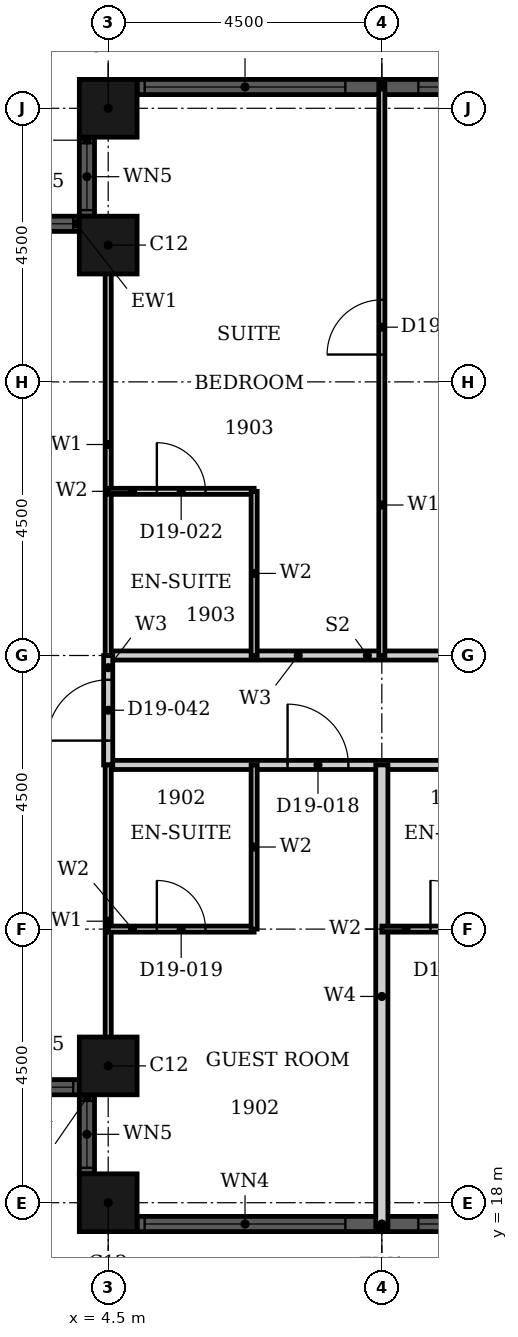
"""IFC4 building model, lengths in metres.
Left out: names, types, materials, properties, quantities, classifications, styles, units other than length and angle.
Written with IfcOpenShell. Run it as: python <this file> out.ifc"""

import sys

from ifc_helpers import new_model, si_unit, direction, frame, frame_2d, origin, origin_2d, place, context, subcontext, project, spatial, rectangle, hollow_rectangle, extrude, element, fill, save


model = new_model("IFC4")
c1 = context("Model", 3, precision=1e-05, world=origin(), true_north=direction((0.0, 1.0)))
c2 = subcontext(c1, "Body", "Model", "MODEL_VIEW")
j1 = project(units=[si_unit("LENGTHUNIT", "METRE"), si_unit("PLANEANGLEUNIT", "RADIAN")], contexts=[c1])
p1 = place(None, origin())
s1 = spatial("IfcSite", under=j1, at=p1, CompositionType="ELEMENT")
p2 = place(p1, origin())
s2 = spatial("IfcBuilding", under=s1, at=p2, CompositionType="ELEMENT")
p3 = place(p2, frame((0.0, 0.0, 81.6)))
s3 = spatial("IfcBuildingStorey", under=s2, at=p3, CompositionType="ELEMENT", Elevation=81.6)
for number, where, z_axis, x_axis in (
    (1, (4.5, 36.0, 0.0), (0.0, 0.0, 1.0), (1.0, 0.0, 0.0)),
    (2, (4.5, 33.75, 0.0), (0.0, 0.0, 1.0), (1.0, 0.0, 0.0)),
    (3, (4.5, 20.25, 0.0), (0.0, 0.0, 1.0), (1.0, 0.0, 0.0)),
    (4, (4.5, 18.0, 0.0), (0.0, 0.0, 1.0), (1.0, 0.0, 0.0)),
):
    element("IfcColumn", number, at=place(p3, frame(where, z_axis=z_axis, x_axis=x_axis)), inside=s3, PredefinedType="COLUMN", context=c2, shape_type="SweptSolid", body=[
        extrude(hollow_rectangle(XDim=0.95, YDim=0.95, WallThickness=0.03, at=origin_2d()), origin(), (0.0, 0.0, 1.0), 3.6),
    ])
p4 = place(p3, frame((13.025, 36.35, 0.0), z_axis=(0.0, 0.0, 1.0), x_axis=(-1.0, 0.0, 0.0)))
e5 = element("IfcWall", 5, at=p4, inside=s3, PredefinedType="SOLIDWALL", context=c2, shape_type="SweptSolid", body=[
    extrude(rectangle(XDim=8.05, YDim=0.25, at=frame_2d((4.025, 0.0))), origin(), (0.0, 0.0, 1.0), 3.6),
])
p5 = place(p4, frame((0.125, 0.0, 0.9)))
e6 = element("IfcOpeningElement", 6, at=p5, cuts=e5, PredefinedType="OPENING", context=c2, shape_type="SweptSolid", body=[
    extrude(rectangle(XDim=3.3, YDim=2.08, at=frame_2d((1.65, 1.04))), frame((0.0, 0.135, 0.0), z_axis=(0.0, -1.0, 0.0), x_axis=(1.0, 0.0, 0.0)), (0.0, 0.0, 1.0), 0.27),
])
p6 = place(p4, frame((4.625, 0.0, 0.9)))
e7 = element("IfcOpeningElement", 7, at=p6, cuts=e5, PredefinedType="OPENING", context=c2, shape_type="SweptSolid", body=[
    extrude(rectangle(XDim=3.3, YDim=2.08, at=frame_2d((1.65, 1.04))), frame((0.0, 0.135, 0.0), z_axis=(0.0, -1.0, 0.0), x_axis=(1.0, 0.0, 0.0)), (0.0, 0.0, 1.0), 0.27),
])
p7 = place(p3, frame((4.15, 35.525, 0.0), z_axis=(0.0, 0.0, 1.0), x_axis=(0.0, -1.0, 0.0)))
e8 = element("IfcWall", 8, at=p7, inside=s3, PredefinedType="SOLIDWALL", context=c2, shape_type="SweptSolid", body=[
    extrude(rectangle(XDim=1.3, YDim=0.25, at=frame_2d((0.65, 0.0))), origin(), (0.0, 0.0, 1.0), 3.6),
])
p8 = place(p7, frame((0.1, 0.0, 0.9)))
e9 = element("IfcOpeningElement", 9, at=p8, cuts=e8, PredefinedType="OPENING", context=c2, shape_type="SweptSolid", body=[
    extrude(rectangle(XDim=1.1, YDim=2.08, at=frame_2d((0.55, 1.04))), frame((0.0, 0.135, 0.0), z_axis=(0.0, -1.0, 0.0), x_axis=(1.0, 0.0, 0.0)), (0.0, 0.0, 1.0), 0.27),
])
p9 = place(p3, frame((4.025, 34.1, 0.0), z_axis=(0.0, 0.0, 1.0), x_axis=(-1.0, 0.0, 0.0)))
e10 = element("IfcWall", 10, at=p9, inside=s3, PredefinedType="SOLIDWALL", context=c2, shape_type="SweptSolid", body=[
    extrude(rectangle(XDim=1.3, YDim=0.25, at=frame_2d((0.65, 0.0))), origin(), (0.0, 0.0, 1.0), 3.6),
])
p10 = place(p9, frame((0.1, 0.0, 0.9)))
e11 = element("IfcOpeningElement", 11, at=p10, cuts=e10, PredefinedType="OPENING", context=c2, shape_type="SweptSolid", body=[
    extrude(rectangle(XDim=1.1, YDim=2.08, at=frame_2d((0.55, 1.04))), frame((0.0, 0.135, 0.0), z_axis=(0.0, -1.0, 0.0), x_axis=(1.0, 0.0, 0.0)), (0.0, 0.0, 1.0), 0.27),
])
p11 = place(p3, frame((2.725, 19.9, 0.0), z_axis=(0.0, 0.0, 1.0), x_axis=(1.0, 0.0, 0.0)))
e12 = element("IfcWall", 12, at=p11, inside=s3, PredefinedType="SOLIDWALL", context=c2, shape_type="SweptSolid", body=[
    extrude(rectangle(XDim=1.3, YDim=0.25, at=frame_2d((0.65, 0.0))), origin(), (0.0, 0.0, 1.0), 3.6),
])
p12 = place(p11, frame((0.1, 0.0, 0.9)))
e13 = element("IfcOpeningElement", 13, at=p12, cuts=e12, PredefinedType="OPENING", context=c2, shape_type="SweptSolid", body=[
    extrude(rectangle(XDim=1.1, YDim=2.08, at=frame_2d((0.55, 1.04))), frame((0.0, 0.135, 0.0), z_axis=(0.0, -1.0, 0.0), x_axis=(1.0, 0.0, 0.0)), (0.0, 0.0, 1.0), 0.27),
])
p13 = place(p3, frame((4.15, 19.775, 0.0), z_axis=(0.0, 0.0, 1.0), x_axis=(0.0, -1.0, 0.0)))
e14 = element("IfcWall", 14, at=p13, inside=s3, PredefinedType="SOLIDWALL", context=c2, shape_type="SweptSolid", body=[
    extrude(rectangle(XDim=1.3, YDim=0.25, at=frame_2d((0.65, 0.0))), origin(), (0.0, 0.0, 1.0), 3.6),
])
p14 = place(p13, frame((0.1, 0.0, 0.9)))
e15 = element("IfcOpeningElement", 15, at=p14, cuts=e14, PredefinedType="OPENING", context=c2, shape_type="SweptSolid", body=[
    extrude(rectangle(XDim=1.1, YDim=2.08, at=frame_2d((0.55, 1.04))), frame((0.0, 0.135, 0.0), z_axis=(0.0, -1.0, 0.0), x_axis=(1.0, 0.0, 0.0)), (0.0, 0.0, 1.0), 0.27),
])
p15 = place(p3, frame((4.975, 17.65, 0.0), z_axis=(0.0, 0.0, 1.0), x_axis=(1.0, 0.0, 0.0)))
e16 = element("IfcWall", 16, at=p15, inside=s3, PredefinedType="SOLIDWALL", context=c2, shape_type="SweptSolid", body=[
    extrude(rectangle(XDim=8.05, YDim=0.25, at=frame_2d((4.025, 0.0))), origin(), (0.0, 0.0, 1.0), 3.6),
])
p16 = place(p15, frame((0.125, 0.0, 0.9)))
e17 = element("IfcOpeningElement", 17, at=p16, cuts=e16, PredefinedType="OPENING", context=c2, shape_type="SweptSolid", body=[
    extrude(rectangle(XDim=3.3, YDim=2.08, at=frame_2d((1.65, 1.04))), frame((0.0, 0.135, 0.0), z_axis=(0.0, -1.0, 0.0), x_axis=(1.0, 0.0, 0.0)), (0.0, 0.0, 1.0), 0.27),
])
p17 = place(p15, frame((4.625, 0.0, 0.9)))
e18 = element("IfcOpeningElement", 18, at=p17, cuts=e16, PredefinedType="OPENING", context=c2, shape_type="SweptSolid", body=[
    extrude(rectangle(XDim=3.3, YDim=2.08, at=frame_2d((1.65, 1.04))), frame((0.0, 0.135, 0.0), z_axis=(0.0, -1.0, 0.0), x_axis=(1.0, 0.0, 0.0)), (0.0, 0.0, 1.0), 0.27),
])
p18 = place(p3, frame((4.5, 25.2, 0.0), z_axis=(0.0, 0.0, 1.0), x_axis=(1.0, 0.0, 0.0)))
e19 = element("IfcWall", 19, at=p18, inside=s3, PredefinedType="PARTITIONING", context=c2, shape_type="SweptSolid", body=[
    extrude(rectangle(XDim=11.7, YDim=0.15, at=frame_2d((5.85, 0.0))), origin(), (0.0, 0.0, 1.0), 3.3),
])
p19 = place(p18, frame((7.45, 0.0, 0.0)))
e20 = element("IfcOpeningElement", 20, at=p19, cuts=e19, PredefinedType="OPENING", context=c2, shape_type="SweptSolid", body=[
    extrude(rectangle(XDim=1.0, YDim=2.1, at=frame_2d((0.5, 1.05))), frame((0.0, 0.085, 0.0), z_axis=(0.0, -1.0, 0.0), x_axis=(1.0, 0.0, 0.0)), (0.0, 0.0, 1.0), 0.17),
])
p20 = place(p18, frame((2.95, 0.0, 0.0)))
e21 = element("IfcOpeningElement", 21, at=p20, cuts=e19, PredefinedType="OPENING", context=c2, shape_type="SweptSolid", body=[
    extrude(rectangle(XDim=1.0, YDim=2.1, at=frame_2d((0.5, 1.05))), frame((0.0, 0.085, 0.0), z_axis=(0.0, -1.0, 0.0), x_axis=(1.0, 0.0, 0.0)), (0.0, 0.0, 1.0), 0.17),
])
p21 = place(p3, frame((4.5, 27.0, 0.0), z_axis=(0.0, 0.0, 1.0), x_axis=(1.0, 0.0, 0.0)))
e22 = element("IfcWall", 22, at=p21, inside=s3, PredefinedType="PARTITIONING", context=c2, shape_type="SweptSolid", body=[
    extrude(rectangle(XDim=11.7, YDim=0.15, at=frame_2d((5.85, 0.0))), origin(), (0.0, 0.0, 1.0), 2.58),
])
p22 = place(p21, frame((6.25, 0.0, 0.0)))
e23 = element("IfcOpeningElement", 23, at=p22, cuts=e22, PredefinedType="OPENING", context=c2, shape_type="SweptSolid", body=[
    extrude(rectangle(XDim=1.0, YDim=2.1, at=frame_2d((0.5, 1.05))), frame((0.0, 0.085, 0.0), z_axis=(0.0, -1.0, 0.0), x_axis=(1.0, 0.0, 0.0)), (0.0, 0.0, 1.0), 0.17),
])
p23 = place(p3, frame((4.5, 25.2, 0.0), z_axis=(0.0, 0.0, 1.0), x_axis=(0.0, 1.0, 0.0)))
e24 = element("IfcWall", 24, at=p23, inside=s3, PredefinedType="PARTITIONING", context=c2, shape_type="SweptSolid", body=[
    extrude(rectangle(XDim=1.8, YDim=0.15, at=frame_2d((0.9, 0.0))), origin(), (0.0, 0.0, 1.0), 3.3),
])
p24 = place(p23, frame((0.4, 0.0, 0.0)))
e25 = element("IfcOpeningElement", 25, at=p24, cuts=e24, PredefinedType="OPENING", context=c2, shape_type="SweptSolid", body=[
    extrude(rectangle(XDim=1.0, YDim=2.1, at=frame_2d((0.5, 1.05))), frame((0.0, 0.085, 0.0), z_axis=(0.0, -1.0, 0.0), x_axis=(1.0, 0.0, 0.0)), (0.0, 0.0, 1.0), 0.17),
])
p25 = place(p3, frame((4.5, 20.06, 0.0), z_axis=(0.0, 0.0, 1.0), x_axis=(0.0, 1.0, 0.0)))
e26 = element("IfcWall", 26, at=p25, inside=s3, PredefinedType="PARTITIONING", context=c2, shape_type="SweptSolid", body=[
    extrude(rectangle(XDim=5.14, YDim=0.1, at=frame_2d((2.57, 0.0))), origin(), (0.0, 0.0, 1.0), 3.3),
])
p26 = place(p3, frame((4.5, 27.0, 0.0), z_axis=(0.0, 0.0, 1.0), x_axis=(0.0, 1.0, 0.0)))
e27 = element("IfcWall", 27, at=p26, inside=s3, PredefinedType="PARTITIONING", context=c2, shape_type="SweptSolid", body=[
    extrude(rectangle(XDim=6.94, YDim=0.1, at=frame_2d((3.47, 0.0))), origin(), (0.0, 0.0, 1.0), 3.3),
])
p27 = place(p3, frame((9.0, 27.0, 0.0), z_axis=(0.0, 0.0, 1.0), x_axis=(0.0, 1.0, 0.0)))
e28 = element("IfcWall", 28, at=p27, inside=s3, PredefinedType="PARTITIONING", context=c2, shape_type="SweptSolid", body=[
    extrude(rectangle(XDim=9.415, YDim=0.1, at=frame_2d((4.708, 0.0))), origin(), (0.0, 0.0, 1.0), 3.3),
])
p28 = place(p27, frame((4.95, 0.0, 0.0)))
e29 = element("IfcOpeningElement", 29, at=p28, cuts=e28, PredefinedType="OPENING", context=c2, shape_type="SweptSolid", body=[
    extrude(rectangle(XDim=0.9, YDim=2.1, at=frame_2d((0.45, 1.05))), frame((0.0, 0.06, 0.0), z_axis=(0.0, -1.0, 0.0), x_axis=(1.0, 0.0, 0.0)), (0.0, 0.0, 1.0), 0.12),
])
p29 = place(p3, frame((9.0, 17.585, 0.0), z_axis=(0.0, 0.0, 1.0), x_axis=(0.0, 1.0, 0.0)))
e30 = element("IfcWall", 30, at=p29, inside=s3, PredefinedType="PARTITIONING", context=c2, shape_type="SweptSolid", body=[
    extrude(rectangle(XDim=7.615, YDim=0.2, at=frame_2d((3.808, 0.0))), origin(), (0.0, 0.0, 1.0), 3.3),
])
p30 = place(p3, frame((9.0, 22.5, 0.0), z_axis=(0.0, 0.0, 1.0), x_axis=(1.0, 0.0, 0.0)))
e31 = element("IfcWall", 31, at=p30, inside=s3, PredefinedType="PARTITIONING", context=c2, shape_type="SweptSolid", body=[
    extrude(rectangle(XDim=2.4, YDim=0.1, at=frame_2d((1.2, 0.0))), origin(), (0.0, 0.0, 1.0), 2.58),
])
p31 = place(p30, frame((0.8, 0.0, 0.0)))
e32 = element("IfcOpeningElement", 32, at=p31, cuts=e31, PredefinedType="OPENING", context=c2, shape_type="SweptSolid", body=[
    extrude(rectangle(XDim=0.8, YDim=2.1, at=frame_2d((0.4, 1.05))), frame((0.0, 0.06, 0.0), z_axis=(0.0, -1.0, 0.0), x_axis=(1.0, 0.0, 0.0)), (0.0, 0.0, 1.0), 0.12),
])
p32 = place(p3, frame((4.5, 22.5, 0.0), z_axis=(0.0, 0.0, 1.0), x_axis=(1.0, 0.0, 0.0)))
e33 = element("IfcWall", 33, at=p32, inside=s3, PredefinedType="PARTITIONING", context=c2, shape_type="SweptSolid", body=[
    extrude(rectangle(XDim=2.4, YDim=0.1, at=frame_2d((1.2, 0.0))), origin(), (0.0, 0.0, 1.0), 2.58),
])
p33 = place(p32, frame((0.8, 0.0, 0.0)))
e34 = element("IfcOpeningElement", 34, at=p33, cuts=e33, PredefinedType="OPENING", context=c2, shape_type="SweptSolid", body=[
    extrude(rectangle(XDim=0.8, YDim=2.1, at=frame_2d((0.4, 1.05))), frame((0.0, 0.06, 0.0), z_axis=(0.0, -1.0, 0.0), x_axis=(1.0, 0.0, 0.0)), (0.0, 0.0, 1.0), 0.12),
])
p34 = place(p3, frame((4.5, 29.7, 0.0), z_axis=(0.0, 0.0, 1.0), x_axis=(1.0, 0.0, 0.0)))
e35 = element("IfcWall", 35, at=p34, inside=s3, PredefinedType="PARTITIONING", context=c2, shape_type="SweptSolid", body=[
    extrude(rectangle(XDim=2.4, YDim=0.1, at=frame_2d((1.2, 0.0))), origin(), (0.0, 0.0, 1.0), 3.3),
])
p35 = place(p34, frame((0.8, 0.0, 0.0)))
e36 = element("IfcOpeningElement", 36, at=p35, cuts=e35, PredefinedType="OPENING", context=c2, shape_type="SweptSolid", body=[
    extrude(rectangle(XDim=0.8, YDim=2.1, at=frame_2d((0.4, 1.05))), frame((0.0, 0.06, 0.0), z_axis=(0.0, -1.0, 0.0), x_axis=(1.0, 0.0, 0.0)), (0.0, 0.0, 1.0), 0.12),
])
for number, where, z_axis, x_axis in (
    (37, (6.9, 22.5, 0.0), (0.0, 0.0, 1.0), (0.0, 1.0, 0.0)),
    (38, (6.9, 27.0, 0.0), (0.0, 0.0, 1.0), (0.0, 1.0, 0.0)),
):
    element("IfcWall", number, at=place(p3, frame(where, z_axis=z_axis, x_axis=x_axis)), inside=s3, PredefinedType="PARTITIONING", context=c2, shape_type="SweptSolid", body=[
        extrude(rectangle(XDim=2.7, YDim=0.1, at=frame_2d((1.35, 0.0))), origin(), (0.0, 0.0, 1.0), 3.3),
    ])
p36 = place(p5, origin())
e39 = element("IfcWindow", 39, at=p36, inside=s3, PartitioningType="SINGLE_PANEL", PredefinedType="WINDOW", context=c2, shape_type="SweptSolid", body=[
    extrude(rectangle(XDim=3.3, YDim=2.08, at=frame_2d((1.65, 1.04))), frame((0.0, 0.03, 0.0), z_axis=(0.0, -1.0, 0.0), x_axis=(1.0, 0.0, 0.0)), (0.0, 0.0, 1.0), 0.06),
])
fill(e6, e39)
p37 = place(p6, origin())
e40 = element("IfcWindow", 40, at=p37, inside=s3, PartitioningType="SINGLE_PANEL", PredefinedType="WINDOW", context=c2, shape_type="SweptSolid", body=[
    extrude(rectangle(XDim=3.3, YDim=2.08, at=frame_2d((1.65, 1.04))), frame((0.0, 0.03, 0.0), z_axis=(0.0, -1.0, 0.0), x_axis=(1.0, 0.0, 0.0)), (0.0, 0.0, 1.0), 0.06),
])
fill(e7, e40)
p38 = place(p8, origin())
e41 = element("IfcWindow", 41, at=p38, inside=s3, PartitioningType="SINGLE_PANEL", PredefinedType="WINDOW", context=c2, shape_type="SweptSolid", body=[
    extrude(rectangle(XDim=1.1, YDim=2.08, at=frame_2d((0.55, 1.04))), frame((0.0, 0.03, 0.0), z_axis=(0.0, -1.0, 0.0), x_axis=(1.0, 0.0, 0.0)), (0.0, 0.0, 1.0), 0.06),
])
fill(e9, e41)
p39 = place(p10, origin())
e42 = element("IfcWindow", 42, at=p39, inside=s3, PartitioningType="SINGLE_PANEL", PredefinedType="WINDOW", context=c2, shape_type="SweptSolid", body=[
    extrude(rectangle(XDim=1.1, YDim=2.08, at=frame_2d((0.55, 1.04))), frame((0.0, 0.03, 0.0), z_axis=(0.0, -1.0, 0.0), x_axis=(1.0, 0.0, 0.0)), (0.0, 0.0, 1.0), 0.06),
])
fill(e11, e42)
p40 = place(p12, origin())
e43 = element("IfcWindow", 43, at=p40, inside=s3, PartitioningType="SINGLE_PANEL", PredefinedType="WINDOW", context=c2, shape_type="SweptSolid", body=[
    extrude(rectangle(XDim=1.1, YDim=2.08, at=frame_2d((0.55, 1.04))), frame((0.0, 0.03, 0.0), z_axis=(0.0, -1.0, 0.0), x_axis=(1.0, 0.0, 0.0)), (0.0, 0.0, 1.0), 0.06),
])
fill(e13, e43)
p41 = place(p14, origin())
e44 = element("IfcWindow", 44, at=p41, inside=s3, PartitioningType="SINGLE_PANEL", PredefinedType="WINDOW", context=c2, shape_type="SweptSolid", body=[
    extrude(rectangle(XDim=1.1, YDim=2.08, at=frame_2d((0.55, 1.04))), frame((0.0, 0.03, 0.0), z_axis=(0.0, -1.0, 0.0), x_axis=(1.0, 0.0, 0.0)), (0.0, 0.0, 1.0), 0.06),
])
fill(e15, e44)
p42 = place(p16, origin())
e45 = element("IfcWindow", 45, at=p42, inside=s3, PartitioningType="SINGLE_PANEL", PredefinedType="WINDOW", context=c2, shape_type="SweptSolid", body=[
    extrude(rectangle(XDim=3.3, YDim=2.08, at=frame_2d((1.65, 1.04))), frame((0.0, 0.03, 0.0), z_axis=(0.0, -1.0, 0.0), x_axis=(1.0, 0.0, 0.0)), (0.0, 0.0, 1.0), 0.06),
])
fill(e17, e45)
p43 = place(p17, origin())
e46 = element("IfcWindow", 46, at=p43, inside=s3, PartitioningType="SINGLE_PANEL", PredefinedType="WINDOW", context=c2, shape_type="SweptSolid", body=[
    extrude(rectangle(XDim=3.3, YDim=2.08, at=frame_2d((1.65, 1.04))), frame((0.0, 0.03, 0.0), z_axis=(0.0, -1.0, 0.0), x_axis=(1.0, 0.0, 0.0)), (0.0, 0.0, 1.0), 0.06),
])
fill(e18, e46)
p44 = place(p31, origin())
e47 = element("IfcDoor", 47, at=p44, inside=s3, OperationType="SINGLE_SWING_LEFT", PredefinedType="DOOR", context=c2, shape_type="SweptSolid", body=[
    extrude(rectangle(XDim=0.8, YDim=2.1, at=frame_2d((0.4, 1.05))), frame((0.0, 0.025, 0.0), z_axis=(0.0, -1.0, 0.0), x_axis=(1.0, 0.0, 0.0)), (0.0, 0.0, 1.0), 0.05),
])
fill(e32, e47)
p45 = place(p20, origin())
e48 = element("IfcDoor", 48, at=p45, inside=s3, OperationType="SINGLE_SWING_RIGHT", PredefinedType="DOOR", context=c2, shape_type="SweptSolid", body=[
    extrude(rectangle(XDim=1.0, YDim=2.1, at=frame_2d((0.5, 1.05))), frame((0.0, 0.025, 0.0), z_axis=(0.0, -1.0, 0.0), x_axis=(1.0, 0.0, 0.0)), (0.0, 0.0, 1.0), 0.05),
])
fill(e21, e48)
p46 = place(p33, origin())
e49 = element("IfcDoor", 49, at=p46, inside=s3, OperationType="SINGLE_SWING_RIGHT", PredefinedType="DOOR", context=c2, shape_type="SweptSolid", body=[
    extrude(rectangle(XDim=0.8, YDim=2.1, at=frame_2d((0.4, 1.05))), frame((0.0, 0.025, 0.0), z_axis=(0.0, -1.0, 0.0), x_axis=(1.0, 0.0, 0.0)), (0.0, 0.0, 1.0), 0.05),
])
fill(e34, e49)
p47 = place(p28, origin())
e50 = element("IfcDoor", 50, at=p47, inside=s3, OperationType="SINGLE_SWING_RIGHT", PredefinedType="DOOR", context=c2, shape_type="SweptSolid", body=[
    extrude(rectangle(XDim=0.9, YDim=2.1, at=frame_2d((0.45, 1.05))), frame((0.0, 0.025, 0.0), z_axis=(0.0, -1.0, 0.0), x_axis=(1.0, 0.0, 0.0)), (0.0, 0.0, 1.0), 0.05),
])
fill(e29, e50)
p48 = place(p35, origin())
e51 = element("IfcDoor", 51, at=p48, inside=s3, OperationType="SINGLE_SWING_LEFT", PredefinedType="DOOR", context=c2, shape_type="SweptSolid", body=[
    extrude(rectangle(XDim=0.8, YDim=2.1, at=frame_2d((0.4, 1.05))), frame((0.0, 0.025, 0.0), z_axis=(0.0, -1.0, 0.0), x_axis=(1.0, 0.0, 0.0)), (0.0, 0.0, 1.0), 0.05),
])
fill(e36, e51)
p49 = place(p24, origin())
e52 = element("IfcDoor", 52, at=p49, inside=s3, OperationType="SINGLE_SWING_RIGHT", PredefinedType="DOOR", context=c2, shape_type="SweptSolid", body=[
    extrude(rectangle(XDim=1.0, YDim=2.1, at=frame_2d((0.5, 1.05))), frame((0.0, 0.025, 0.0), z_axis=(0.0, -1.0, 0.0), x_axis=(1.0, 0.0, 0.0)), (0.0, 0.0, 1.0), 0.05),
])
fill(e25, e52)
save(model, sys.argv[1])
